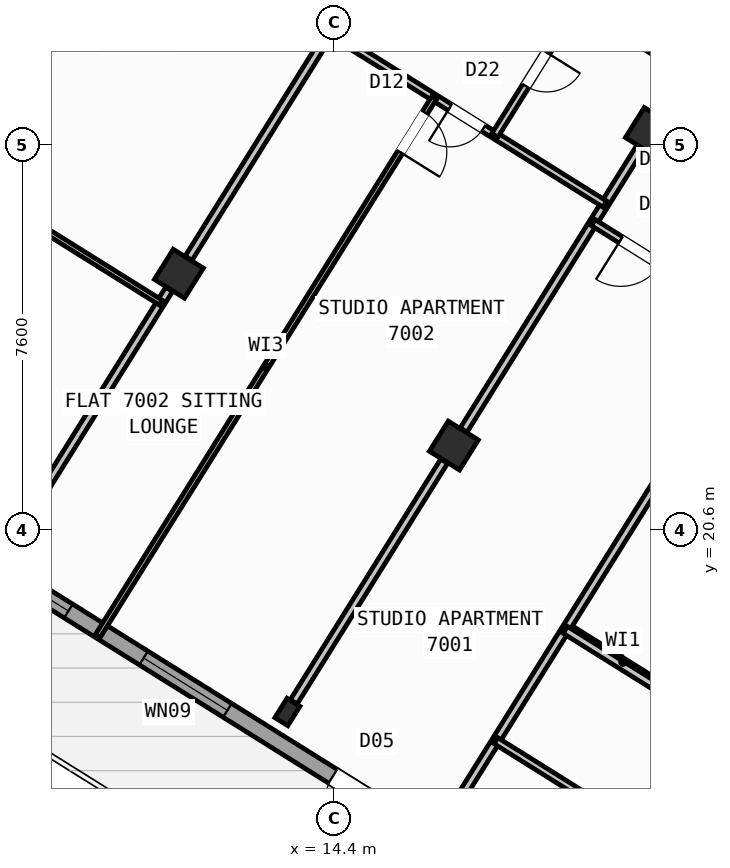
"""IFC4 building model, lengths in metres.
Left out: names, types, materials, properties, quantities, classifications, styles, units other than length and angle.
Written with IfcOpenShell. Run it as: python <this file> out.ifc"""

import sys

from ifc_helpers import new_model, si_unit, direction, frame, frame_2d, origin, origin_2d, place, context, subcontext, project, spatial, rectangle, hollow_rectangle, i_section, extrude, source, transform, mapped, element, fill, save


model = new_model("IFC4")
c1 = context("Model", 3, precision=1e-05, world=origin(), true_north=direction((0.0, 1.0)))
c2 = subcontext(c1, "Body", "Model", "MODEL_VIEW")
j1 = project(units=[si_unit("LENGTHUNIT", "METRE"), si_unit("PLANEANGLEUNIT", "RADIAN")], contexts=[c1])
p1 = place(None, origin())
s1 = spatial("IfcSite", under=j1, at=p1, CompositionType="ELEMENT")
p2 = place(p1, origin())
s2 = spatial("IfcBuilding", under=s1, at=p2, CompositionType="ELEMENT")
p3 = place(p2, frame((0.0, 0.0, 277.2)))
s3 = spatial("IfcBuildingStorey", under=s2, at=p3, CompositionType="ELEMENT", Elevation=277.2)
m1 = source(origin(), c2, "Body", "SweptSolid", [
    extrude(hollow_rectangle(XDim=0.7, YDim=0.7, WallThickness=0.028, at=origin_2d()), origin(), (0.0, 0.0, 1.0), 3.6),
])
for number, where, z_axis, x_axis in (
    (1, (20.632, 28.452, 0.0), (0.0, 0.0, 1.0), (-0.848, 0.53, 0.0)),
    (2, (16.764, 22.261, 0.0), (0.0, 0.0, 1.0), (-0.848, 0.53, 0.0)),
):
    element("IfcColumn", number, at=place(p3, frame(where, z_axis=z_axis, x_axis=x_axis)), inside=s3, PredefinedType="COLUMN", context=c2, shape_type="MappedRepresentation", body=[
        mapped(m1, transform((0.0, 0.0, 0.0), scale=1.0)),
    ])
m2 = source(origin(), c2, "Body", "SweptSolid", [
    extrude(i_section(OverallWidth=0.3, OverallDepth=0.45, WebThickness=0.014, FlangeThickness=0.026, at=origin_2d()), origin(), (0.0, 0.0, 1.0), 3.6),
])
p4 = place(p3, frame((13.478, 17.003, 0.0), z_axis=(0.0, 0.0, 1.0), x_axis=(-0.848048096156, 0.529919264233, 0.0)))
e3 = element("IfcColumn", 3, at=p4, inside=s3, PredefinedType="COLUMN", context=c2, shape_type="MappedRepresentation", body=[
    mapped(m2, transform((0.0, 0.0, 0.0), scale=1.0)),
])
p5 = place(p3, frame((11.336, 25.653, 0.0), z_axis=(0.0, 0.0, 1.0), x_axis=(-0.848048096156, 0.529919264233, 0.0)))
e4 = element("IfcColumn", 4, at=p5, inside=s3, PredefinedType="COLUMN", context=c2, shape_type="MappedRepresentation", body=[
    mapped(m1, transform((0.0, 0.0, 0.0), scale=1.0)),
])
p6 = place(p3, frame((29.268, 6.429, 0.0), z_axis=(0.0, 0.0, 1.0), x_axis=(-0.848049971435, 0.529916263149, 0.0)))
e5 = element("IfcWall", 5, at=p6, inside=s3, PredefinedType="STANDARD", context=c2, shape_type="SweptSolid", body=[
    extrude(rectangle(XDim=31.588, YDim=0.32, at=frame_2d((15.794, 0.0))), origin(), (0.0, 0.0, 1.0), 3.35),
])
p7 = place(p6, frame((16.362, 0.0, 0.0)))
e6 = element("IfcOpeningElement", 6, at=p7, cuts=e5, PredefinedType="OPENING", context=c2, shape_type="SweptSolid", body=[
    extrude(rectangle(XDim=1.2, YDim=2.15, at=frame_2d((0.6, 1.075))), frame((0.0, 0.17, 0.0), z_axis=(0.0, -1.0, 0.0), x_axis=(1.0, 0.0, 0.0)), (0.0, 0.0, 1.0), 0.34),
])
p8 = place(p6, frame((3.859, 0.0, 0.9)))
e7 = element("IfcOpeningElement", 7, at=p8, cuts=e5, PredefinedType="OPENING", context=c2, shape_type="SweptSolid", body=[
    extrude(rectangle(XDim=1.65, YDim=1.45, at=frame_2d((0.825, 0.725))), frame((0.0, 0.17, 0.0), z_axis=(0.0, -1.0, 0.0), x_axis=(1.0, 0.0, 0.0)), (0.0, 0.0, 1.0), 0.34),
])
p9 = place(p6, frame((10.519, 0.0, 0.9)))
e8 = element("IfcOpeningElement", 8, at=p9, cuts=e5, PredefinedType="OPENING", context=c2, shape_type="SweptSolid", body=[
    extrude(rectangle(XDim=1.65, YDim=1.45, at=frame_2d((0.825, 0.725))), frame((0.0, 0.17, 0.0), z_axis=(0.0, -1.0, 0.0), x_axis=(1.0, 0.0, 0.0)), (0.0, 0.0, 1.0), 0.34),
])
p10 = place(p6, frame((20.015, 0.0, 0.95)))
e9 = element("IfcOpeningElement", 9, at=p10, cuts=e5, PredefinedType="OPENING", context=c2, shape_type="SweptSolid", body=[
    extrude(rectangle(XDim=1.95, YDim=1.35, at=frame_2d((0.975, 0.675))), frame((0.0, 0.17, 0.0), z_axis=(0.0, -1.0, 0.0), x_axis=(1.0, 0.0, 0.0)), (0.0, 0.0, 1.0), 0.34),
])
p11 = place(p6, frame((23.715, 0.0, 1.0)))
e10 = element("IfcOpeningElement", 10, at=p11, cuts=e5, PredefinedType="OPENING", context=c2, shape_type="SweptSolid", body=[
    extrude(rectangle(XDim=0.9, YDim=1.25, at=frame_2d((0.45, 0.625))), frame((0.0, 0.17, 0.0), z_axis=(0.0, -1.0, 0.0), x_axis=(1.0, 0.0, 0.0)), (0.0, 0.0, 1.0), 0.34),
])
p12 = place(p6, frame((27.706, 0.0, 0.9)))
e11 = element("IfcOpeningElement", 11, at=p12, cuts=e5, PredefinedType="OPENING", context=c2, shape_type="SweptSolid", body=[
    extrude(rectangle(XDim=1.65, YDim=1.45, at=frame_2d((0.825, 0.725))), frame((0.0, 0.17, 0.0), z_axis=(0.0, -1.0, 0.0), x_axis=(1.0, 0.0, 0.0)), (0.0, 0.0, 1.0), 0.34),
])
p13 = place(p3, frame((2.415, 23.452, 0.0), z_axis=(0.0, 0.0, 1.0), x_axis=(0.52991049553, 0.848053575387, 0.0)))
e12 = element("IfcWall", 12, at=p13, inside=s3, PredefinedType="STANDARD", context=c2, shape_type="SweptSolid", body=[
    extrude(rectangle(XDim=21.587, YDim=0.32, at=frame_2d((10.794, 0.0))), origin(), (0.0, 0.0, 1.0), 3.35),
])
p14 = place(p13, frame((2.368, 0.0, 0.9)))
e13 = element("IfcOpeningElement", 13, at=p14, cuts=e12, PredefinedType="OPENING", context=c2, shape_type="SweptSolid", body=[
    extrude(rectangle(XDim=1.65, YDim=1.45, at=frame_2d((0.825, 0.725))), frame((0.0, 0.17, 0.0), z_axis=(0.0, -1.0, 0.0), x_axis=(1.0, 0.0, 0.0)), (0.0, 0.0, 1.0), 0.34),
])
p15 = place(p13, frame((8.094, 0.0, 0.9)))
e14 = element("IfcOpeningElement", 14, at=p15, cuts=e12, PredefinedType="OPENING", context=c2, shape_type="SweptSolid", body=[
    extrude(rectangle(XDim=1.35, YDim=1.45, at=frame_2d((0.675, 0.725))), frame((0.0, 0.17, 0.0), z_axis=(0.0, -1.0, 0.0), x_axis=(1.0, 0.0, 0.0)), (0.0, 0.0, 1.0), 0.34),
])
p16 = place(p13, frame((11.044, 0.0, 0.9)))
e15 = element("IfcOpeningElement", 15, at=p16, cuts=e12, PredefinedType="OPENING", context=c2, shape_type="SweptSolid", body=[
    extrude(rectangle(XDim=1.35, YDim=1.45, at=frame_2d((0.675, 0.725))), frame((0.0, 0.17, 0.0), z_axis=(0.0, -1.0, 0.0), x_axis=(1.0, 0.0, 0.0)), (0.0, 0.0, 1.0), 0.34),
])
p17 = place(p13, frame((18.809, 0.0, 1.0)))
e16 = element("IfcOpeningElement", 16, at=p17, cuts=e12, PredefinedType="OPENING", context=c2, shape_type="SweptSolid", body=[
    extrude(rectangle(XDim=0.9, YDim=1.25, at=frame_2d((0.45, 0.625))), frame((0.0, 0.17, 0.0), z_axis=(0.0, -1.0, 0.0), x_axis=(1.0, 0.0, 0.0)), (0.0, 0.0, 1.0), 0.34),
])
p18 = place(p3, frame((14.138, 41.825, 0.0), z_axis=(0.0, 0.0, 1.0), x_axis=(0.848046498049, -0.529921821731, 0.0)))
e17 = element("IfcWall", 17, at=p18, inside=s3, PredefinedType="STANDARD", context=c2, shape_type="SweptSolid", body=[
    extrude(rectangle(XDim=31.588, YDim=0.32, at=frame_2d((15.794, 0.0))), origin(), (0.0, 0.0, 1.0), 3.35),
])
p19 = place(p18, frame((3.568, 0.0, 0.0)))
e18 = element("IfcOpeningElement", 18, at=p19, cuts=e17, PredefinedType="OPENING", context=c2, shape_type="SweptSolid", body=[
    extrude(rectangle(XDim=1.05, YDim=2.15, at=frame_2d((0.525, 1.075))), frame((0.0, 0.17, 0.0), z_axis=(0.0, -1.0, 0.0), x_axis=(1.0, 0.0, 0.0)), (0.0, 0.0, 1.0), 0.34),
])
p20 = place(p18, frame((1.046, 0.0, 0.9)))
e19 = element("IfcOpeningElement", 19, at=p20, cuts=e17, PredefinedType="OPENING", context=c2, shape_type="SweptSolid", body=[
    extrude(rectangle(XDim=1.65, YDim=1.45, at=frame_2d((0.825, 0.725))), frame((0.0, 0.17, 0.0), z_axis=(0.0, -1.0, 0.0), x_axis=(1.0, 0.0, 0.0)), (0.0, 0.0, 1.0), 0.34),
])
p21 = place(p18, frame((8.61, 0.0, 0.9)))
e20 = element("IfcOpeningElement", 20, at=p21, cuts=e17, PredefinedType="OPENING", context=c2, shape_type="SweptSolid", body=[
    extrude(rectangle(XDim=1.35, YDim=1.45, at=frame_2d((0.675, 0.725))), frame((0.0, 0.17, 0.0), z_axis=(0.0, -1.0, 0.0), x_axis=(1.0, 0.0, 0.0)), (0.0, 0.0, 1.0), 0.34),
])
p22 = place(p18, frame((13.599, 0.0, 0.95)))
e21 = element("IfcOpeningElement", 21, at=p22, cuts=e17, PredefinedType="OPENING", context=c2, shape_type="SweptSolid", body=[
    extrude(rectangle(XDim=1.95, YDim=1.35, at=frame_2d((0.975, 0.675))), frame((0.0, 0.17, 0.0), z_axis=(0.0, -1.0, 0.0), x_axis=(1.0, 0.0, 0.0)), (0.0, 0.0, 1.0), 0.34),
])
p23 = place(p18, frame((17.154, 0.0, 1.0)))
e22 = element("IfcOpeningElement", 22, at=p23, cuts=e17, PredefinedType="OPENING", context=c2, shape_type="SweptSolid", body=[
    extrude(rectangle(XDim=0.9, YDim=1.25, at=frame_2d((0.45, 0.625))), frame((0.0, 0.17, 0.0), z_axis=(0.0, -1.0, 0.0), x_axis=(1.0, 0.0, 0.0)), (0.0, 0.0, 1.0), 0.34),
])
p24 = place(p18, frame((21.719, 0.0, 0.9)))
e23 = element("IfcOpeningElement", 23, at=p24, cuts=e17, PredefinedType="OPENING", context=c2, shape_type="SweptSolid", body=[
    extrude(rectangle(XDim=1.65, YDim=1.45, at=frame_2d((0.825, 0.725))), frame((0.0, 0.17, 0.0), z_axis=(0.0, -1.0, 0.0), x_axis=(1.0, 0.0, 0.0)), (0.0, 0.0, 1.0), 0.34),
])
p25 = place(p18, frame((27.419, 0.0, 0.9)))
e24 = element("IfcOpeningElement", 24, at=p25, cuts=e17, PredefinedType="OPENING", context=c2, shape_type="SweptSolid", body=[
    extrude(rectangle(XDim=1.65, YDim=1.45, at=frame_2d((0.825, 0.725))), frame((0.0, 0.17, 0.0), z_axis=(0.0, -1.0, 0.0), x_axis=(1.0, 0.0, 0.0)), (0.0, 0.0, 1.0), 0.34),
])
p26 = place(p3, frame((21.206, 17.292, 0.0), z_axis=(0.0, 0.0, 1.0), x_axis=(-0.848050851465, 0.529914854792, 0.0)))
e25 = element("IfcWall", 25, at=p26, inside=s3, PredefinedType="PARTITIONING", context=c2, shape_type="SweptSolid", body=[
    extrude(rectangle(XDim=2.61, YDim=0.16, at=frame_2d((1.305, 0.0))), origin(), (0.0, 0.0, 1.0), 3.34),
])
p27 = place(p3, frame((24.588, 27.631, 0.0), z_axis=(0.0, 0.0, 1.0), x_axis=(-0.529914586043, -0.848051019396, 0.0)))
e26 = element("IfcWall", 26, at=p27, inside=s3, PredefinedType="PARTITIONING", context=c2, shape_type="SweptSolid", body=[
    extrude(rectangle(XDim=15.35, YDim=0.16, at=frame_2d((7.675, 0.0))), origin(), (0.0, 0.0, 1.0), 3.34),
])
p28 = place(p3, frame((25.754, 29.497, 0.0), z_axis=(0.0, 0.0, 1.0), x_axis=(-0.848045850158, 0.529922858565, 0.0)))
e27 = element("IfcWall", 27, at=p28, inside=s3, PredefinedType="PARTITIONING", context=c2, shape_type="SweptSolid", body=[
    extrude(rectangle(XDim=16.73, YDim=0.16, at=frame_2d((8.365, 0.0))), origin(), (0.0, 0.0, 1.0), 3.34),
])
p29 = place(p28, frame((1.588, 0.0, 0.0)))
e28 = element("IfcOpeningElement", 28, at=p29, cuts=e27, PredefinedType="OPENING", context=c2, shape_type="SweptSolid", body=[
    extrude(rectangle(XDim=1.0, YDim=2.1, at=frame_2d((0.5, 1.05))), frame((0.0, 0.09, 0.0), z_axis=(0.0, -1.0, 0.0), x_axis=(1.0, 0.0, 0.0)), (0.0, 0.0, 1.0), 0.18),
])
p30 = place(p28, frame((6.685, 0.0, 0.0)))
e29 = element("IfcOpeningElement", 29, at=p30, cuts=e27, PredefinedType="OPENING", context=c2, shape_type="SweptSolid", body=[
    extrude(rectangle(XDim=1.0, YDim=2.1, at=frame_2d((0.5, 1.05))), frame((0.0, 0.09, 0.0), z_axis=(0.0, -1.0, 0.0), x_axis=(1.0, 0.0, 0.0)), (0.0, 0.0, 1.0), 0.18),
])
p31 = place(p28, frame((12.951, 0.0, 0.0)))
e30 = element("IfcOpeningElement", 30, at=p31, cuts=e27, PredefinedType="OPENING", context=c2, shape_type="SweptSolid", body=[
    extrude(rectangle(XDim=1.0, YDim=2.1, at=frame_2d((0.5, 1.05))), frame((0.0, 0.09, 0.0), z_axis=(0.0, -1.0, 0.0), x_axis=(1.0, 0.0, 0.0)), (0.0, 0.0, 1.0), 0.18),
])
p32 = place(p3, frame((24.588, 27.631, 0.0), z_axis=(0.0, 0.0, 1.0), x_axis=(-0.848041752158, 0.529929416617, 0.0)))
e31 = element("IfcWall", 31, at=p32, inside=s3, PredefinedType="PARTITIONING", context=c2, shape_type="SweptSolid", body=[
    extrude(rectangle(XDim=16.73, YDim=0.16, at=frame_2d((8.365, 0.0))), origin(), (0.0, 0.0, 1.0), 3.34),
])
p33 = place(p32, frame((2.22, 0.0, 0.0)))
e32 = element("IfcOpeningElement", 32, at=p33, cuts=e31, PredefinedType="OPENING", context=c2, shape_type="SweptSolid", body=[
    extrude(rectangle(XDim=0.86, YDim=2.05, at=frame_2d((0.43, 1.025))), frame((0.0, 0.09, 0.0), z_axis=(0.0, -1.0, 0.0), x_axis=(1.0, 0.0, 0.0)), (0.0, 0.0, 1.0), 0.18),
])
p34 = place(p32, frame((7.82, 0.0, 0.0)))
e33 = element("IfcOpeningElement", 33, at=p34, cuts=e31, PredefinedType="OPENING", context=c2, shape_type="SweptSolid", body=[
    extrude(rectangle(XDim=1.0, YDim=2.1, at=frame_2d((0.5, 1.05))), frame((0.0, 0.09, 0.0), z_axis=(0.0, -1.0, 0.0), x_axis=(1.0, 0.0, 0.0)), (0.0, 0.0, 1.0), 0.18),
])
p35 = place(p32, frame((12.95, 0.0, 0.0)))
e34 = element("IfcOpeningElement", 34, at=p35, cuts=e31, PredefinedType="OPENING", context=c2, shape_type="SweptSolid", body=[
    extrude(rectangle(XDim=1.0, YDim=2.1, at=frame_2d((0.5, 1.05))), frame((0.0, 0.09, 0.0), z_axis=(0.0, -1.0, 0.0), x_axis=(1.0, 0.0, 0.0)), (0.0, 0.0, 1.0), 0.18),
])
p36 = place(p3, frame((20.44, 28.145, 0.0), z_axis=(0.0, 0.0, 1.0), x_axis=(-0.529938869374, -0.84803584519, 0.0)))
e35 = element("IfcWall", 35, at=p36, inside=s3, PredefinedType="PARTITIONING", context=c2, shape_type="SweptSolid", body=[
    extrude(rectangle(XDim=6.576, YDim=0.16, at=frame_2d((3.288, 0.0))), origin(), (0.0, 0.0, 1.0), 2.875),
])
p37 = place(p3, frame((16.572, 21.954, 0.0), z_axis=(0.0, 0.0, 1.0), x_axis=(-0.529904903214, -0.848057069748, 0.0)))
e36 = element("IfcWall", 36, at=p37, inside=s3, PredefinedType="PARTITIONING", context=c2, shape_type="SweptSolid", body=[
    extrude(rectangle(XDim=5.601, YDim=0.16, at=frame_2d((2.801, 0.0))), origin(), (0.0, 0.0, 1.0), 2.875),
])
p38 = place(p3, frame((22.728, 24.654, 0.0), z_axis=(0.0, 0.0, 1.0), x_axis=(-0.848059820872, 0.529900500304, 0.0)))
e37 = element("IfcWall", 37, at=p38, inside=s3, PredefinedType="PLUMBINGWALL", context=c2, shape_type="SweptSolid", body=[
    extrude(rectangle(XDim=3.79, YDim=0.14, at=frame_2d((1.895, 0.0))), origin(), (0.0, 0.0, 1.0), 3.34),
])
p39 = place(p38, frame((2.23, 0.0, 0.0)))
e38 = element("IfcOpeningElement", 38, at=p39, cuts=e37, PredefinedType="OPENING", context=c2, shape_type="SweptSolid", body=[
    extrude(rectangle(XDim=0.92, YDim=2.08, at=frame_2d((0.46, 1.04))), frame((0.0, 0.08, 0.0), z_axis=(0.0, -1.0, 0.0), x_axis=(1.0, 0.0, 0.0)), (0.0, 0.0, 1.0), 0.16),
])
p40 = place(p3, frame((15.013, 31.537, 0.0), z_axis=(0.0, 0.0, 1.0), x_axis=(-0.529922185033, -0.848046271031, 0.0)))
e39 = element("IfcWall", 39, at=p40, inside=s3, PredefinedType="PARTITIONING", context=c2, shape_type="SweptSolid", body=[
    extrude(rectangle(XDim=6.576, YDim=0.16, at=frame_2d((3.288, 0.0))), origin(), (0.0, 0.0, 1.0), 2.875),
])
p41 = place(p3, frame((11.144, 25.346, 0.0), z_axis=(0.0, 0.0, 1.0), x_axis=(-0.529904903214, -0.848057069748, 0.0)))
e40 = element("IfcWall", 40, at=p41, inside=s3, PredefinedType="PARTITIONING", context=c2, shape_type="SweptSolid", body=[
    extrude(rectangle(XDim=5.601, YDim=0.16, at=frame_2d((2.801, 0.0))), origin(), (0.0, 0.0, 1.0), 2.875),
])
p42 = place(p3, frame((19.742, 27.027, 0.0), z_axis=(0.0, 0.0, 1.0), x_axis=(-0.848039019877, 0.529933789039, 0.0)))
e41 = element("IfcWall", 41, at=p42, inside=s3, PredefinedType="PLUMBINGWALL", context=c2, shape_type="SweptSolid", body=[
    extrude(rectangle(XDim=6.4, YDim=0.14, at=frame_2d((3.2, 0.0))), origin(), (0.0, 0.0, 1.0), 3.34),
])
p43 = place(p42, frame((2.824, 0.0, 0.0)))
e42 = element("IfcOpeningElement", 42, at=p43, cuts=e41, PredefinedType="OPENING", context=c2, shape_type="SweptSolid", body=[
    extrude(rectangle(XDim=0.78, YDim=2.05, at=frame_2d((0.39, 1.025))), frame((0.0, 0.08, 0.0), z_axis=(0.0, -1.0, 0.0), x_axis=(1.0, 0.0, 0.0)), (0.0, 0.0, 1.0), 0.16),
])
p44 = place(p3, frame((19.203, 30.996, 0.0), z_axis=(0.0, 0.0, 1.0), x_axis=(-0.52992768316, -0.848042835369, 0.0)))
e43 = element("IfcWall", 43, at=p44, inside=s3, PredefinedType="PLUMBINGWALL", context=c2, shape_type="SweptSolid", body=[
    extrude(rectangle(XDim=3.08, YDim=0.14, at=frame_2d((1.54, 0.0))), origin(), (0.0, 0.0, 1.0), 3.34),
])
p45 = place(p44, frame((1.15, 0.0, 0.0)))
e44 = element("IfcOpeningElement", 44, at=p45, cuts=e43, PredefinedType="OPENING", context=c2, shape_type="SweptSolid", body=[
    extrude(rectangle(XDim=0.78, YDim=2.05, at=frame_2d((0.39, 1.025))), frame((0.0, 0.08, 0.0), z_axis=(0.0, -1.0, 0.0), x_axis=(1.0, 0.0, 0.0)), (0.0, 0.0, 1.0), 0.16),
])
p46 = place(p3, frame((16.377, 29.13, 0.0), z_axis=(0.0, 0.0, 1.0), x_axis=(-0.529923687379, -0.848045332252, 0.0)))
e45 = element("IfcWall", 45, at=p46, inside=s3, PredefinedType="PARTITIONING", context=c2, shape_type="SweptSolid", body=[
    extrude(rectangle(XDim=12.54, YDim=0.11, at=frame_2d((6.27, 0.0))), origin(), (0.0, 0.0, 1.0), 3.34),
])
p47 = place(p46, frame((0.35, 0.0, 0.0)))
e46 = element("IfcOpeningElement", 46, at=p47, cuts=e45, PredefinedType="OPENING", context=c2, shape_type="SweptSolid", body=[
    extrude(rectangle(XDim=0.92, YDim=2.08, at=frame_2d((0.46, 1.04))), frame((0.0, 0.065, 0.0), z_axis=(0.0, -1.0, 0.0), x_axis=(1.0, 0.0, 0.0)), (0.0, 0.0, 1.0), 0.13),
])
p48 = place(p3, frame((10.98, 25.083, 0.0), z_axis=(0.0, 0.0, 1.0), x_axis=(-0.848048787466, 0.529918157905, 0.0)))
e47 = element("IfcWall", 47, at=p48, inside=s3, PredefinedType="PARTITIONING", context=c2, shape_type="SweptSolid", body=[
    extrude(rectangle(XDim=6.52, YDim=0.11, at=frame_2d((3.26, 0.0))), origin(), (0.0, 0.0, 1.0), 3.34),
])
p49 = place(p48, frame((2.8, 0.0, 0.0)))
e48 = element("IfcOpeningElement", 48, at=p49, cuts=e47, PredefinedType="OPENING", context=c2, shape_type="SweptSolid", body=[
    extrude(rectangle(XDim=0.92, YDim=2.08, at=frame_2d((0.46, 1.04))), frame((0.0, 0.065, 0.0), z_axis=(0.0, -1.0, 0.0), x_axis=(1.0, 0.0, 0.0)), (0.0, 0.0, 1.0), 0.13),
])
p50 = place(p3, frame((32.164, 10.374, 0.0), z_axis=(0.0, 0.0, 1.0), x_axis=(-0.848044107957, 0.529925646633, 0.0)))
e49 = element("IfcWall", 49, at=p50, inside=s3, PredefinedType="PARTITIONING", context=c2, shape_type="SweptSolid", body=[
    extrude(rectangle(XDim=15.57, YDim=0.16, at=frame_2d((7.785, 0.0))), origin(), (0.0, 0.0, 1.0), 3.34),
])
p51 = place(p50, frame((10.83, 0.0, 0.0)))
e50 = element("IfcOpeningElement", 50, at=p51, cuts=e49, PredefinedType="OPENING", context=c2, shape_type="SweptSolid", body=[
    extrude(rectangle(XDim=1.0, YDim=2.1, at=frame_2d((0.5, 1.05))), frame((0.0, 0.09, 0.0), z_axis=(0.0, -1.0, 0.0), x_axis=(1.0, 0.0, 0.0)), (0.0, 0.0, 1.0), 0.18),
])
p52 = place(p3, frame((29.72, 8.859, 0.0), z_axis=(0.0, 0.0, 1.0), x_axis=(-0.848049134363, 0.529917602752, 0.0)))
e51 = element("IfcWall", 51, at=p52, inside=s3, PredefinedType="PLUMBINGWALL", context=c2, shape_type="SweptSolid", body=[
    extrude(rectangle(XDim=14.3, YDim=0.14, at=frame_2d((7.15, 0.0))), origin(), (0.0, 0.0, 1.0), 3.34),
])
p53 = place(p52, frame((9.57, 0.0, 0.0)))
e52 = element("IfcOpeningElement", 52, at=p53, cuts=e51, PredefinedType="OPENING", context=c2, shape_type="SweptSolid", body=[
    extrude(rectangle(XDim=0.92, YDim=2.08, at=frame_2d((0.46, 1.04))), frame((0.0, 0.08, 0.0), z_axis=(0.0, -1.0, 0.0), x_axis=(1.0, 0.0, 0.0)), (0.0, 0.0, 1.0), 0.16),
])
m3 = source(origin(), c2, "Body", "SweptSolid", [
    extrude(rectangle(XDim=1.2, YDim=2.15, at=frame_2d((0.6, 1.075))), frame((0.0, 0.025, 0.0), z_axis=(0.0, -1.0, 0.0), x_axis=(1.0, 0.0, 0.0)), (0.0, 0.0, 1.0), 0.05),
])
p54 = place(p7, origin())
e53 = element("IfcDoor", 53, at=p54, inside=s3, OperationType="SINGLE_SWING_LEFT", PredefinedType="DOOR", context=c2, shape_type="MappedRepresentation", body=[
    mapped(m3, transform((0.0, 0.0, 0.0), scale=1.0)),
])
fill(e6, e53)
m4 = source(origin(), c2, "Body", "SweptSolid", [
    extrude(rectangle(XDim=1.95, YDim=1.35, at=frame_2d((0.975, 0.675))), frame((0.0, 0.03, 0.0), z_axis=(0.0, -1.0, 0.0), x_axis=(1.0, 0.0, 0.0)), (0.0, 0.0, 1.0), 0.06),
])
p55 = place(p10, origin())
e54 = element("IfcWindow", 54, at=p55, inside=s3, PartitioningType="SINGLE_PANEL", PredefinedType="WINDOW", context=c2, shape_type="MappedRepresentation", body=[
    mapped(m4, transform((0.0, 0.0, 0.0), scale=1.0)),
])
fill(e9, e54)
m5 = source(origin(), c2, "Body", "SweptSolid", [
    extrude(rectangle(XDim=0.9, YDim=1.25, at=frame_2d((0.45, 0.625))), frame((0.0, 0.03, 0.0), z_axis=(0.0, -1.0, 0.0), x_axis=(1.0, 0.0, 0.0)), (0.0, 0.0, 1.0), 0.06),
])
p56 = place(p11, origin())
e55 = element("IfcWindow", 55, at=p56, inside=s3, PartitioningType="SINGLE_PANEL", PredefinedType="WINDOW", context=c2, shape_type="MappedRepresentation", body=[
    mapped(m5, transform((0.0, 0.0, 0.0), scale=1.0)),
])
fill(e10, e55)
m6 = source(origin(), c2, "Body", "SweptSolid", [
    extrude(rectangle(XDim=0.92, YDim=2.08, at=frame_2d((0.46, 1.04))), frame((0.0, 0.025, 0.0), z_axis=(0.0, -1.0, 0.0), x_axis=(1.0, 0.0, 0.0)), (0.0, 0.0, 1.0), 0.05),
])
p57 = place(p39, origin())
e56 = element("IfcDoor", 56, at=p57, inside=s3, OperationType="SINGLE_SWING_RIGHT", PredefinedType="DOOR", context=c2, shape_type="MappedRepresentation", body=[
    mapped(m6, transform((0.0, 0.0, 0.0), scale=1.0)),
])
fill(e38, e56)
p58 = place(p47, origin())
e57 = element("IfcDoor", 57, at=p58, inside=s3, OperationType="SINGLE_SWING_RIGHT", PredefinedType="DOOR", context=c2, shape_type="MappedRepresentation", body=[
    mapped(m6, transform((0.0, 0.0, 0.0), scale=1.0)),
])
fill(e46, e57)
m7 = source(origin(), c2, "Body", "SweptSolid", [
    extrude(rectangle(XDim=0.78, YDim=2.05, at=frame_2d((0.39, 1.025))), frame((0.0, 0.025, 0.0), z_axis=(0.0, -1.0, 0.0), x_axis=(1.0, 0.0, 0.0)), (0.0, 0.0, 1.0), 0.05),
])
p59 = place(p43, origin())
e58 = element("IfcDoor", 58, at=p59, inside=s3, OperationType="SINGLE_SWING_RIGHT", PredefinedType="DOOR", context=c2, shape_type="MappedRepresentation", body=[
    mapped(m7, transform((0.0, 0.0, 0.0), scale=1.0)),
])
fill(e42, e58)
p60 = place(p45, origin())
e59 = element("IfcDoor", 59, at=p60, inside=s3, OperationType="SINGLE_SWING_LEFT", PredefinedType="DOOR", context=c2, shape_type="MappedRepresentation", body=[
    mapped(m7, transform((0.0, 0.0, 0.0), scale=1.0)),
])
fill(e44, e59)
save(model, sys.argv[1])
